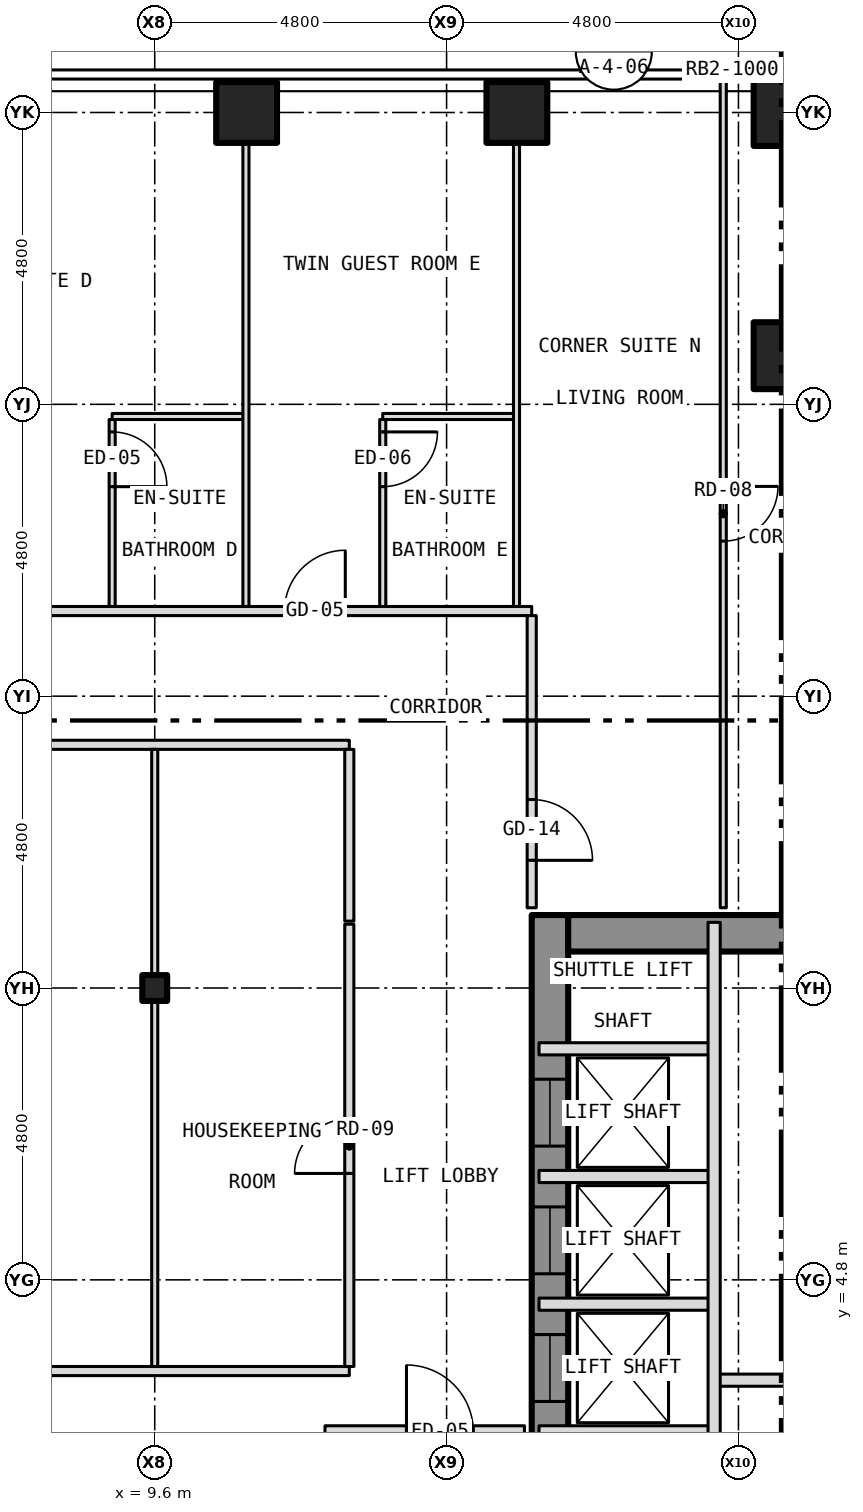
"""IFC4 building model, lengths in metres.
Left out: names, types, materials, properties, quantities, classifications, styles, units other than length and angle.
Written with IfcOpenShell. Run it as: python <this file> out.ifc"""

import sys

from ifc_helpers import new_model, si_unit, direction, frame, frame_2d, origin, origin_2d, place, context, subcontext, project, spatial, rectangle, hollow_rectangle, i_section, extrude, element, fill, save


model = new_model("IFC4")
c1 = context("Model", 3, precision=1e-05, world=origin(), true_north=direction((0.0, 1.0)))
c2 = subcontext(c1, "Body", "Model", "MODEL_VIEW")
j1 = project(units=[si_unit("LENGTHUNIT", "METRE"), si_unit("PLANEANGLEUNIT", "RADIAN")], contexts=[c1])
p1 = place(None, origin())
s1 = spatial("IfcSite", under=j1, at=p1, CompositionType="ELEMENT")
p2 = place(p1, origin())
s2 = spatial("IfcBuilding", under=s1, at=p2, CompositionType="ELEMENT")
p3 = place(p2, frame((0.0, 0.0, 39.0)))
s3 = spatial("IfcBuildingStorey", under=s2, at=p3, CompositionType="ELEMENT", Elevation=39.0)
for number, where, z_axis, x_axis in (
    (1, (11.111, 24.0, -0.15), (0.0, 0.0, 1.0), (1.0, 0.0, 0.0)),
    (2, (15.556, 24.0, -0.15), (0.0, 0.0, 1.0), (1.0, 0.0, 0.0)),
):
    element("IfcColumn", number, at=place(p3, frame(where, z_axis=z_axis, x_axis=x_axis)), inside=s3, PredefinedType="COLUMN", context=c2, shape_type="SweptSolid", body=[
        extrude(hollow_rectangle(XDim=1.0, YDim=1.0, WallThickness=0.06, at=origin_2d()), origin(), (0.0, 0.0, 1.0), 3.5),
    ])
for number, where, z_axis, x_axis in (
    (3, (20.0, 24.0, -0.15), (0.0, 0.0, 1.0), (1.0, 0.0, 0.0)),
    (4, (20.0, 20.0, -0.15), (0.0, 0.0, 1.0), (1.0, 0.0, 0.0)),
):
    element("IfcColumn", number, at=place(p3, frame(where, z_axis=z_axis, x_axis=x_axis)), inside=s3, PredefinedType="COLUMN", context=c2, shape_type="SweptSolid", body=[
        extrude(hollow_rectangle(XDim=1.1, YDim=1.1, WallThickness=0.065, at=origin_2d()), origin(), (0.0, 0.0, 1.0), 3.5),
    ])
p4 = place(p3, frame((9.6, 9.6, -0.15), z_axis=(0.0, 0.0, 1.0), x_axis=(1.0, 0.0, 0.0)))
e5 = element("IfcColumn", 5, at=p4, inside=s3, PredefinedType="COLUMN", context=c2, shape_type="SweptSolid", body=[
    extrude(i_section(OverallWidth=0.409, OverallDepth=0.424, WebThickness=0.033, FlangeThickness=0.052, at=origin_2d()), origin(), (0.0, 0.0, 1.0), 3.5),
])
p5 = place(p3, frame((16.1, -10.8, 0.0), z_axis=(0.0, 0.0, 1.0), x_axis=(0.0, 1.0, 0.0)))
e6 = element("IfcWall", 6, at=p5, inside=s3, PredefinedType="SHEAR", context=c2, shape_type="SweptSolid", body=[
    extrude(rectangle(XDim=21.6, YDim=0.6, at=frame_2d((10.8, 0.0))), origin(), (0.0, 0.0, 1.0), 3.25),
])
p6 = place(p5, frame((9.4, 0.0, 0.0)))
e7 = element("IfcOpeningElement", 7, at=p6, cuts=e6, PredefinedType="OPENING", context=c2, shape_type="SweptSolid", body=[
    extrude(rectangle(XDim=1.1, YDim=2.1, at=frame_2d((0.55, 1.05))), frame((0.0, 0.312, 0.0), z_axis=(0.0, -1.0, 0.0), x_axis=(1.0, 0.0, 0.0)), (0.0, 0.0, 1.0), 0.624),
])
p7 = place(p5, frame((11.5, 0.0, 0.0)))
e8 = element("IfcOpeningElement", 8, at=p7, cuts=e6, PredefinedType="OPENING", context=c2, shape_type="SweptSolid", body=[
    extrude(rectangle(XDim=1.1, YDim=2.1, at=frame_2d((0.55, 1.05))), frame((0.0, 0.312, 0.0), z_axis=(0.0, -1.0, 0.0), x_axis=(1.0, 0.0, 0.0)), (0.0, 0.0, 1.0), 0.624),
])
p8 = place(p5, frame((13.6, 0.0, 0.0)))
e9 = element("IfcOpeningElement", 9, at=p8, cuts=e6, PredefinedType="OPENING", context=c2, shape_type="SweptSolid", body=[
    extrude(rectangle(XDim=1.1, YDim=2.1, at=frame_2d((0.55, 1.05))), frame((0.0, 0.312, 0.0), z_axis=(0.0, -1.0, 0.0), x_axis=(1.0, 0.0, 0.0)), (0.0, 0.0, 1.0), 0.624),
])
p9 = place(p5, frame((15.7, 0.0, 0.0)))
e10 = element("IfcOpeningElement", 10, at=p9, cuts=e6, PredefinedType="OPENING", context=c2, shape_type="SweptSolid", body=[
    extrude(rectangle(XDim=1.1, YDim=2.1, at=frame_2d((0.55, 1.05))), frame((0.0, 0.312, 0.0), z_axis=(0.0, -1.0, 0.0), x_axis=(1.0, 0.0, 0.0)), (0.0, 0.0, 1.0), 0.624),
])
p10 = place(p5, frame((17.8, 0.0, 0.0)))
e11 = element("IfcOpeningElement", 11, at=p10, cuts=e6, PredefinedType="OPENING", context=c2, shape_type="SweptSolid", body=[
    extrude(rectangle(XDim=1.1, YDim=2.1, at=frame_2d((0.55, 1.05))), frame((0.0, 0.312, 0.0), z_axis=(0.0, -1.0, 0.0), x_axis=(1.0, 0.0, 0.0)), (0.0, 0.0, 1.0), 0.624),
])
p11 = place(p5, frame((5.642, 0.0, 0.0)))
e12 = element("IfcOpeningElement", 12, at=p11, cuts=e6, PredefinedType="OPENING", context=c2, shape_type="SweptSolid", body=[
    extrude(rectangle(XDim=1.1, YDim=2.1, at=frame_2d((0.55, 1.05))), frame((0.0, 0.312, 0.0), z_axis=(0.0, -1.0, 0.0), x_axis=(1.0, 0.0, 0.0)), (0.0, 0.0, 1.0), 0.624),
])
p12 = place(p5, frame((7.5, 0.0, 0.0)))
e13 = element("IfcOpeningElement", 13, at=p12, cuts=e6, PredefinedType="OPENING", context=c2, shape_type="SweptSolid", body=[
    extrude(rectangle(XDim=1.1, YDim=2.1, at=frame_2d((0.55, 1.05))), frame((0.0, 0.312, 0.0), z_axis=(0.0, -1.0, 0.0), x_axis=(1.0, 0.0, 0.0)), (0.0, 0.0, 1.0), 0.624),
])
p13 = place(p3, frame((16.4, 10.5, 0.0), z_axis=(0.0, 0.0, 1.0), x_axis=(1.0, 0.0, 0.0)))
e14 = element("IfcWall", 14, at=p13, inside=s3, PredefinedType="SHEAR", context=c2, shape_type="SweptSolid", body=[
    extrude(rectangle(XDim=7.0, YDim=0.6, at=frame_2d((3.5, 0.0))), origin(), (0.0, 0.0, 1.0), 3.25),
])
p14 = place(p3, frame((12.4, 2.3, 0.0), z_axis=(0.0, 0.0, 1.0), x_axis=(1.0, 0.0, 0.0)))
e15 = element("IfcWall", 15, at=p14, inside=s3, PredefinedType="PARTITIONING", context=c2, shape_type="SweptSolid", body=[
    extrude(rectangle(XDim=3.28, YDim=0.2, at=frame_2d((1.64, 0.0))), origin(), (0.0, 0.0, 1.0), 3.35),
])
p15 = place(p14, frame((1.34, 0.0, 0.0)))
e16 = element("IfcOpeningElement", 16, at=p15, cuts=e15, PredefinedType="OPENING", context=c2, shape_type="SweptSolid", body=[
    extrude(rectangle(XDim=1.1, YDim=2.1, at=frame_2d((0.55, 1.05))), frame((0.0, 0.112, 0.0), z_axis=(0.0, -1.0, 0.0), x_axis=(1.0, 0.0, 0.0)), (0.0, 0.0, 1.0), 0.224),
])
p16 = place(p3, frame((15.92, 2.3, 0.0), z_axis=(0.0, 0.0, 1.0), x_axis=(1.0, 0.0, 0.0)))
e17 = element("IfcWall", 17, at=p16, inside=s3, PredefinedType="PARTITIONING", context=c2, shape_type="SweptSolid", body=[
    extrude(rectangle(XDim=2.88, YDim=0.2, at=frame_2d((1.44, 0.0))), origin(), (0.0, 0.0, 1.0), 3.25),
])
p17 = place(p3, frame((18.8, 3.15, 0.0), z_axis=(0.0, 0.0, 1.0), x_axis=(1.0, 0.0, 0.0)))
e18 = element("IfcWall", 18, at=p17, inside=s3, PredefinedType="PARTITIONING", context=c2, shape_type="SweptSolid", body=[
    extrude(rectangle(XDim=5.08, YDim=0.2, at=frame_2d((2.54, 0.0))), origin(), (0.0, 0.0, 1.0), 3.25),
])
p18 = place(p3, frame((-12.8, 3.3, 0.0), z_axis=(0.0, 0.0, 1.0), x_axis=(1.0, 0.0, 0.0)))
e19 = element("IfcWall", 19, at=p18, inside=s3, PredefinedType="PARTITIONING", context=c2, shape_type="SweptSolid", body=[
    extrude(rectangle(XDim=25.6, YDim=0.15, at=frame_2d((12.8, 0.0))), origin(), (0.0, 0.0, 1.0), 3.35),
])
p19 = place(p18, frame((1.95, 0.0, 0.0)))
e20 = element("IfcOpeningElement", 20, at=p19, cuts=e19, PredefinedType="OPENING", context=c2, shape_type="SweptSolid", body=[
    extrude(rectangle(XDim=0.9, YDim=2.1, at=frame_2d((0.45, 1.05))), frame((0.0, 0.087, 0.0), z_axis=(0.0, -1.0, 0.0), x_axis=(1.0, 0.0, 0.0)), (0.0, 0.0, 1.0), 0.174),
])
for number, where, z_axis, x_axis in (
    (21, (15.92, 4.4, 0.0), (0.0, 0.0, 1.0), (1.0, 0.0, 0.0)),
    (22, (15.92, 6.5, 0.0), (0.0, 0.0, 1.0), (1.0, 0.0, 0.0)),
    (23, (15.92, 8.6, 0.0), (0.0, 0.0, 1.0), (1.0, 0.0, 0.0)),
):
    element("IfcWall", number, at=place(p3, frame(where, z_axis=z_axis, x_axis=x_axis)), inside=s3, PredefinedType="PARTITIONING", context=c2, shape_type="SweptSolid", body=[
        extrude(rectangle(XDim=2.88, YDim=0.2, at=frame_2d((1.44, 0.0))), origin(), (0.0, 0.0, 1.0), 3.25),
    ])
p20 = place(p3, frame((-12.8, 13.6, 0.0), z_axis=(0.0, 0.0, 1.0), x_axis=(1.0, 0.0, 0.0)))
e24 = element("IfcWall", 24, at=p20, inside=s3, PredefinedType="PARTITIONING", context=c2, shape_type="SweptSolid", body=[
    extrude(rectangle(XDim=25.6, YDim=0.15, at=frame_2d((12.8, 0.0))), origin(), (0.0, 0.0, 1.0), 3.35),
])
p21 = place(p20, frame((12.35, 0.0, 0.0)))
e25 = element("IfcOpeningElement", 25, at=p21, cuts=e24, PredefinedType="OPENING", context=c2, shape_type="SweptSolid", body=[
    extrude(rectangle(XDim=0.9, YDim=2.1, at=frame_2d((0.45, 1.05))), frame((0.0, 0.087, 0.0), z_axis=(0.0, -1.0, 0.0), x_axis=(1.0, 0.0, 0.0)), (0.0, 0.0, 1.0), 0.174),
])
p22 = place(p3, frame((-15.8, 15.8, 0.0), z_axis=(0.0, 0.0, 1.0), x_axis=(1.0, 0.0, 0.0)))
e26 = element("IfcWall", 26, at=p22, inside=s3, PredefinedType="PARTITIONING", context=c2, shape_type="SweptSolid", body=[
    extrude(rectangle(XDim=31.6, YDim=0.15, at=frame_2d((15.8, 0.0))), origin(), (0.0, 0.0, 1.0), 3.35),
])
p23 = place(p22, frame((3.067, 0.0, 0.0)))
e27 = element("IfcOpeningElement", 27, at=p23, cuts=e26, PredefinedType="OPENING", context=c2, shape_type="SweptSolid", body=[
    extrude(rectangle(XDim=1.0, YDim=2.1, at=frame_2d((0.5, 1.05))), frame((0.0, 0.087, 0.0), z_axis=(0.0, -1.0, 0.0), x_axis=(1.0, 0.0, 0.0)), (0.0, 0.0, 1.0), 0.174),
])
p24 = place(p22, frame((6.189, 0.0, 0.0)))
e28 = element("IfcOpeningElement", 28, at=p24, cuts=e26, PredefinedType="OPENING", context=c2, shape_type="SweptSolid", body=[
    extrude(rectangle(XDim=1.0, YDim=2.1, at=frame_2d((0.5, 1.05))), frame((0.0, 0.087, 0.0), z_axis=(0.0, -1.0, 0.0), x_axis=(1.0, 0.0, 0.0)), (0.0, 0.0, 1.0), 0.174),
])
p25 = place(p22, frame((15.311, 0.0, 0.0)))
e29 = element("IfcOpeningElement", 29, at=p25, cuts=e26, PredefinedType="OPENING", context=c2, shape_type="SweptSolid", body=[
    extrude(rectangle(XDim=1.0, YDim=2.1, at=frame_2d((0.5, 1.05))), frame((0.0, 0.087, 0.0), z_axis=(0.0, -1.0, 0.0), x_axis=(1.0, 0.0, 0.0)), (0.0, 0.0, 1.0), 0.174),
])
p26 = place(p22, frame((21.977, 0.0, 0.0)))
e30 = element("IfcOpeningElement", 30, at=p26, cuts=e26, PredefinedType="OPENING", context=c2, shape_type="SweptSolid", body=[
    extrude(rectangle(XDim=1.0, YDim=2.1, at=frame_2d((0.5, 1.05))), frame((0.0, 0.087, 0.0), z_axis=(0.0, -1.0, 0.0), x_axis=(1.0, 0.0, 0.0)), (0.0, 0.0, 1.0), 0.174),
])
p27 = place(p22, frame((27.534, 0.0, 0.0)))
e31 = element("IfcOpeningElement", 31, at=p27, cuts=e26, PredefinedType="OPENING", context=c2, shape_type="SweptSolid", body=[
    extrude(rectangle(XDim=1.0, YDim=2.1, at=frame_2d((0.5, 1.05))), frame((0.0, 0.087, 0.0), z_axis=(0.0, -1.0, 0.0), x_axis=(1.0, 0.0, 0.0)), (0.0, 0.0, 1.0), 0.174),
])
p28 = place(p3, frame((8.9, 19.0, 0.0), z_axis=(0.0, 0.0, 1.0), x_axis=(1.0, 0.0, 0.0)))
e32 = element("IfcWall", 32, at=p28, inside=s3, PredefinedType="PARTITIONING", context=c2, shape_type="SweptSolid", body=[
    extrude(rectangle(XDim=2.2, YDim=0.1, at=frame_2d((1.1, 0.0))), origin(), (0.0, 0.0, 1.0), 3.35),
])
p29 = place(p3, frame((13.35, 19.0, 0.0), z_axis=(0.0, 0.0, 1.0), x_axis=(1.0, 0.0, 0.0)))
e33 = element("IfcWall", 33, at=p29, inside=s3, PredefinedType="PARTITIONING", context=c2, shape_type="SweptSolid", body=[
    extrude(rectangle(XDim=2.2, YDim=0.1, at=frame_2d((1.1, 0.0))), origin(), (0.0, 0.0, 1.0), 3.35),
])
p30 = place(p3, frame((8.9, 15.875, 0.0), z_axis=(0.0, 0.0, 1.0), x_axis=(0.0, 1.0, 0.0)))
e34 = element("IfcWall", 34, at=p30, inside=s3, PredefinedType="PARTITIONING", context=c2, shape_type="SweptSolid", body=[
    extrude(rectangle(XDim=3.075, YDim=0.1, at=frame_2d((1.538, 0.0))), origin(), (0.0, 0.0, 1.0), 3.35),
])
p31 = place(p30, frame((1.971, 0.0, 0.0)))
e35 = element("IfcOpeningElement", 35, at=p31, cuts=e34, PredefinedType="OPENING", context=c2, shape_type="SweptSolid", body=[
    extrude(rectangle(XDim=0.9, YDim=2.1, at=frame_2d((0.45, 1.05))), frame((0.0, 0.062, 0.0), z_axis=(0.0, -1.0, 0.0), x_axis=(1.0, 0.0, 0.0)), (0.0, 0.0, 1.0), 0.124),
])
p32 = place(p3, frame((9.6, 3.375, 0.0), z_axis=(0.0, 0.0, 1.0), x_axis=(0.0, 1.0, 0.0)))
e36 = element("IfcWall", 36, at=p32, inside=s3, PredefinedType="PARTITIONING", context=c2, shape_type="SweptSolid", body=[
    extrude(rectangle(XDim=6.021, YDim=0.1, at=frame_2d((3.01, 0.0))), origin(), (0.0, 0.0, 1.0), 2.728),
])
p33 = place(p3, frame((9.6, 9.396, 0.0), z_axis=(0.0, 0.0, 1.0), x_axis=(0.0, 1.0, 0.0)))
e37 = element("IfcWall", 37, at=p33, inside=s3, PredefinedType="PARTITIONING", context=c2, shape_type="SweptSolid", body=[
    extrude(rectangle(XDim=0.408, YDim=0.1, at=frame_2d((0.204, 0.0))), origin(), (0.0, 0.0, 1.0), 3.35),
])
p34 = place(p3, frame((9.6, 9.804, 0.0), z_axis=(0.0, 0.0, 1.0), x_axis=(0.0, 1.0, 0.0)))
e38 = element("IfcWall", 38, at=p34, inside=s3, PredefinedType="PARTITIONING", context=c2, shape_type="SweptSolid", body=[
    extrude(rectangle(XDim=3.721, YDim=0.1, at=frame_2d((1.86, 0.0))), origin(), (0.0, 0.0, 1.0), 2.728),
])
p35 = place(p3, frame((11.1, 15.875, 0.0), z_axis=(0.0, 0.0, 1.0), x_axis=(0.0, 1.0, 0.0)))
e39 = element("IfcWall", 39, at=p35, inside=s3, PredefinedType="PARTITIONING", context=c2, shape_type="SweptSolid", body=[
    extrude(rectangle(XDim=8.005, YDim=0.1, at=frame_2d((4.002, 0.0))), origin(), (0.0, 0.0, 1.0), 3.35),
])
p36 = place(p3, frame((12.8, 3.375, 0.0), z_axis=(0.0, 0.0, 1.0), x_axis=(0.0, 1.0, 0.0)))
e40 = element("IfcWall", 40, at=p36, inside=s3, PredefinedType="PARTITIONING", context=c2, shape_type="SweptSolid", body=[
    extrude(rectangle(XDim=7.275, YDim=0.15, at=frame_2d((3.637, 0.0))), origin(), (0.0, 0.0, 1.0), 3.35),
])
p37 = place(p36, frame((3.175, 0.0, 0.0)))
e41 = element("IfcOpeningElement", 41, at=p37, cuts=e40, PredefinedType="OPENING", context=c2, shape_type="SweptSolid", body=[
    extrude(rectangle(XDim=0.9, YDim=2.1, at=frame_2d((0.45, 1.05))), frame((0.0, 0.087, 0.0), z_axis=(0.0, -1.0, 0.0), x_axis=(1.0, 0.0, 0.0)), (0.0, 0.0, 1.0), 0.174),
])
p38 = place(p3, frame((12.8, 10.7, 0.0), z_axis=(0.0, 0.0, 1.0), x_axis=(0.0, 1.0, 0.0)))
e42 = element("IfcWall", 42, at=p38, inside=s3, PredefinedType="PARTITIONING", context=c2, shape_type="SweptSolid", body=[
    extrude(rectangle(XDim=2.825, YDim=0.15, at=frame_2d((1.413, 0.0))), origin(), (0.0, 0.0, 1.0), 3.35),
])
p39 = place(p3, frame((13.35, 15.875, 0.0), z_axis=(0.0, 0.0, 1.0), x_axis=(0.0, 1.0, 0.0)))
e43 = element("IfcWall", 43, at=p39, inside=s3, PredefinedType="PARTITIONING", context=c2, shape_type="SweptSolid", body=[
    extrude(rectangle(XDim=3.075, YDim=0.1, at=frame_2d((1.538, 0.0))), origin(), (0.0, 0.0, 1.0), 3.35),
])
p40 = place(p39, frame((1.971, 0.0, 0.0)))
e44 = element("IfcOpeningElement", 44, at=p40, cuts=e43, PredefinedType="OPENING", context=c2, shape_type="SweptSolid", body=[
    extrude(rectangle(XDim=0.9, YDim=2.1, at=frame_2d((0.45, 1.05))), frame((0.0, 0.062, 0.0), z_axis=(0.0, -1.0, 0.0), x_axis=(1.0, 0.0, 0.0)), (0.0, 0.0, 1.0), 0.124),
])
p41 = place(p3, frame((15.55, 15.875, 0.0), z_axis=(0.0, 0.0, 1.0), x_axis=(0.0, 1.0, 0.0)))
e45 = element("IfcWall", 45, at=p41, inside=s3, PredefinedType="PARTITIONING", context=c2, shape_type="SweptSolid", body=[
    extrude(rectangle(XDim=8.005, YDim=0.1, at=frame_2d((4.002, 0.0))), origin(), (0.0, 0.0, 1.0), 3.35),
])
p42 = place(p3, frame((15.8, 10.92, 0.0), z_axis=(0.0, 0.0, 1.0), x_axis=(0.0, 1.0, 0.0)))
e46 = element("IfcWall", 46, at=p42, inside=s3, PredefinedType="PARTITIONING", context=c2, shape_type="SweptSolid", body=[
    extrude(rectangle(XDim=4.805, YDim=0.15, at=frame_2d((2.403, 0.0))), origin(), (0.0, 0.0, 1.0), 3.35),
])
p43 = place(p42, frame((0.78, 0.0, 0.0)))
e47 = element("IfcOpeningElement", 47, at=p43, cuts=e46, PredefinedType="OPENING", context=c2, shape_type="SweptSolid", body=[
    extrude(rectangle(XDim=1.0, YDim=2.1, at=frame_2d((0.5, 1.05))), frame((0.0, 0.087, 0.0), z_axis=(0.0, -1.0, 0.0), x_axis=(1.0, 0.0, 0.0)), (0.0, 0.0, 1.0), 0.174),
])
p44 = place(p3, frame((18.8, -1.8, 0.0), z_axis=(0.0, 0.0, 1.0), x_axis=(0.0, 1.0, 0.0)))
e48 = element("IfcWall", 48, at=p44, inside=s3, PredefinedType="PARTITIONING", context=c2, shape_type="SweptSolid", body=[
    extrude(rectangle(XDim=12.48, YDim=0.2, at=frame_2d((6.24, 0.0))), origin(), (0.0, 0.0, 1.0), 3.25),
])
p45 = place(p3, frame((18.95, 10.92, 0.0), z_axis=(0.0, 0.0, 1.0), x_axis=(0.0, 1.0, 0.0)))
e49 = element("IfcWall", 49, at=p45, inside=s3, PredefinedType="PARTITIONING", context=c2, shape_type="SweptSolid", body=[
    extrude(rectangle(XDim=13.66, YDim=0.1, at=frame_2d((6.83, 0.0))), origin(), (0.0, 0.0, 1.0), 3.35),
])
p46 = place(p45, frame((6.03, 0.0, 0.0)))
e50 = element("IfcOpeningElement", 50, at=p46, cuts=e49, PredefinedType="OPENING", context=c2, shape_type="SweptSolid", body=[
    extrude(rectangle(XDim=0.9, YDim=2.1, at=frame_2d((0.45, 1.05))), frame((0.0, 0.062, 0.0), z_axis=(0.0, -1.0, 0.0), x_axis=(1.0, 0.0, 0.0)), (0.0, 0.0, 1.0), 0.124),
])
p47 = place(p8, origin())
e51 = element("IfcDoor", 51, at=p47, inside=s3, OperationType="SLIDING_TO_LEFT", PredefinedType="DOOR", context=c2, shape_type="SweptSolid", body=[
    extrude(rectangle(XDim=1.1, YDim=2.1, at=frame_2d((0.55, 1.05))), frame((0.0, 0.025, 0.0), z_axis=(0.0, -1.0, 0.0), x_axis=(1.0, 0.0, 0.0)), (0.0, 0.0, 1.0), 0.05),
])
fill(e9, e51)
p48 = place(p9, origin())
e52 = element("IfcDoor", 52, at=p48, inside=s3, OperationType="SLIDING_TO_LEFT", PredefinedType="DOOR", context=c2, shape_type="SweptSolid", body=[
    extrude(rectangle(XDim=1.1, YDim=2.1, at=frame_2d((0.55, 1.05))), frame((0.0, 0.025, 0.0), z_axis=(0.0, -1.0, 0.0), x_axis=(1.0, 0.0, 0.0)), (0.0, 0.0, 1.0), 0.05),
])
fill(e10, e52)
p49 = place(p10, origin())
e53 = element("IfcDoor", 53, at=p49, inside=s3, OperationType="SLIDING_TO_LEFT", PredefinedType="DOOR", context=c2, shape_type="SweptSolid", body=[
    extrude(rectangle(XDim=1.1, YDim=2.1, at=frame_2d((0.55, 1.05))), frame((0.0, 0.025, 0.0), z_axis=(0.0, -1.0, 0.0), x_axis=(1.0, 0.0, 0.0)), (0.0, 0.0, 1.0), 0.05),
])
fill(e11, e53)
p50 = place(p15, origin())
e54 = element("IfcDoor", 54, at=p50, inside=s3, OperationType="SINGLE_SWING_LEFT", PredefinedType="DOOR", context=c2, shape_type="SweptSolid", body=[
    extrude(rectangle(XDim=1.1, YDim=2.1, at=frame_2d((0.55, 1.05))), frame((0.0, 0.025, 0.0), z_axis=(0.0, -1.0, 0.0), x_axis=(1.0, 0.0, 0.0)), (0.0, 0.0, 1.0), 0.05),
])
fill(e16, e54)
p51 = place(p31, origin())
e55 = element("IfcDoor", 55, at=p51, inside=s3, OperationType="SINGLE_SWING_LEFT", PredefinedType="DOOR", context=c2, shape_type="SweptSolid", body=[
    extrude(rectangle(XDim=0.9, YDim=2.1, at=frame_2d((0.45, 1.05))), frame((0.0, 0.025, 0.0), z_axis=(0.0, -1.0, 0.0), x_axis=(1.0, 0.0, 0.0)), (0.0, 0.0, 1.0), 0.05),
])
fill(e35, e55)
p52 = place(p27, origin())
e56 = element("IfcDoor", 56, at=p52, inside=s3, OperationType="SINGLE_SWING_RIGHT", PredefinedType="DOOR", context=c2, shape_type="SweptSolid", body=[
    extrude(rectangle(XDim=1.0, YDim=2.1, at=frame_2d((0.5, 1.05))), frame((0.0, 0.025, 0.0), z_axis=(0.0, -1.0, 0.0), x_axis=(1.0, 0.0, 0.0)), (0.0, 0.0, 1.0), 0.05),
])
fill(e31, e56)
p53 = place(p40, origin())
e57 = element("IfcDoor", 57, at=p53, inside=s3, OperationType="SINGLE_SWING_RIGHT", PredefinedType="DOOR", context=c2, shape_type="SweptSolid", body=[
    extrude(rectangle(XDim=0.9, YDim=2.1, at=frame_2d((0.45, 1.05))), frame((0.0, 0.025, 0.0), z_axis=(0.0, -1.0, 0.0), x_axis=(1.0, 0.0, 0.0)), (0.0, 0.0, 1.0), 0.05),
])
fill(e44, e57)
p54 = place(p43, origin())
e58 = element("IfcDoor", 58, at=p54, inside=s3, OperationType="SINGLE_SWING_LEFT", PredefinedType="DOOR", context=c2, shape_type="SweptSolid", body=[
    extrude(rectangle(XDim=1.0, YDim=2.1, at=frame_2d((0.5, 1.05))), frame((0.0, 0.025, 0.0), z_axis=(0.0, -1.0, 0.0), x_axis=(1.0, 0.0, 0.0)), (0.0, 0.0, 1.0), 0.05),
])
fill(e47, e58)
p55 = place(p46, origin())
e59 = element("IfcDoor", 59, at=p55, inside=s3, OperationType="SINGLE_SWING_RIGHT", PredefinedType="DOOR", context=c2, shape_type="SweptSolid", body=[
    extrude(rectangle(XDim=0.9, YDim=2.1, at=frame_2d((0.45, 1.05))), frame((0.0, 0.025, 0.0), z_axis=(0.0, -1.0, 0.0), x_axis=(1.0, 0.0, 0.0)), (0.0, 0.0, 1.0), 0.05),
])
fill(e50, e59)
p56 = place(p37, origin())
e60 = element("IfcDoor", 60, at=p56, inside=s3, OperationType="SINGLE_SWING_LEFT", PredefinedType="DOOR", context=c2, shape_type="SweptSolid", body=[
    extrude(rectangle(XDim=0.9, YDim=2.1, at=frame_2d((0.45, 1.05))), frame((0.0, 0.025, 0.0), z_axis=(0.0, -1.0, 0.0), x_axis=(1.0, 0.0, 0.0)), (0.0, 0.0, 1.0), 0.05),
])
fill(e41, e60)
save(model, sys.argv[1])
